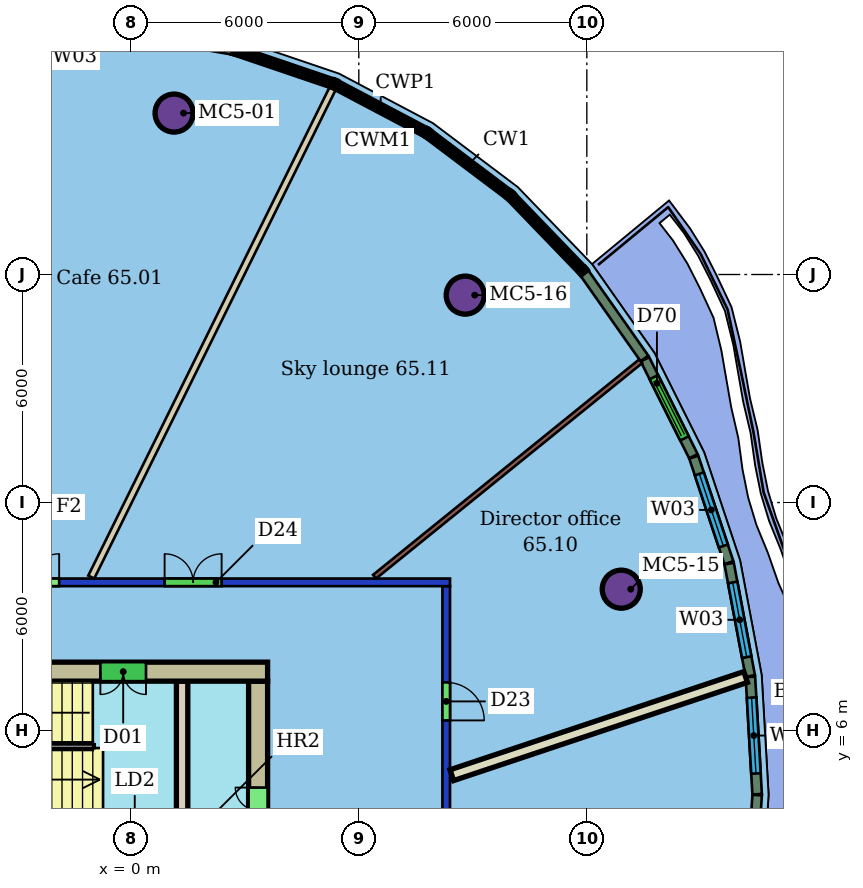
"""IFC4 building model, lengths in metres.
Left out: names, types, materials, properties, quantities, classifications, styles, units other than length and angle.
Written with IfcOpenShell. Run it as: python <this file> out.ifc"""

import sys

from ifc_helpers import new_model, si_unit, direction, frame, frame_2d, origin, origin_2d, place, context, subcontext, project, spatial, rectangle, hollow_circle, extrude, element, fill, save


model = new_model("IFC4")
c1 = context("Model", 3, precision=1e-05, world=origin(), true_north=direction((0.0, 1.0)))
c2 = subcontext(c1, "Body", "Model", "MODEL_VIEW")
j1 = project(units=[si_unit("LENGTHUNIT", "METRE"), si_unit("PLANEANGLEUNIT", "RADIAN")], contexts=[c1])
p1 = place(None, origin())
s1 = spatial("IfcSite", under=j1, at=p1, CompositionType="ELEMENT")
p2 = place(p1, origin())
s2 = spatial("IfcBuilding", under=s1, at=p2, CompositionType="ELEMENT")
p3 = place(p2, frame((0.0, 0.0, 264.9)))
s3 = spatial("IfcBuildingStorey", under=s2, at=p3, CompositionType="ELEMENT", Elevation=264.9)
for number, where, z_axis, x_axis in (
    (1, (1.138, 22.247, 0.0), (0.0, 0.0, 1.0), (1.0, 0.0, 0.0)),
    (2, (12.906, 9.72, 0.0), (0.0, 0.0, 1.0), (1.0, 0.0, 0.0)),
    (3, (8.8, 17.457, 0.0), (0.0, 0.0, 1.0), (1.0, 0.0, 0.0)),
):
    element("IfcColumn", number, at=place(p3, frame(where, z_axis=z_axis, x_axis=x_axis)), inside=s3, PredefinedType="COLUMN", context=c2, shape_type="SweptSolid", body=[
        extrude(hollow_circle(Radius=0.5, WallThickness=0.04, at=origin_2d()), origin(), (0.0, 0.0, 1.0), 3.45),
    ])
p4 = place(p3, frame((-20.4, 9.9, 0.0), z_axis=(0.0, 0.0, 1.0), x_axis=(1.0, 0.0, 0.0)))
e4 = element("IfcWall", 4, at=p4, inside=s3, PredefinedType="PARTITIONING", context=c2, shape_type="SweptSolid", body=[
    extrude(rectangle(XDim=28.8, YDim=0.2, at=frame_2d((14.4, 0.0))), origin(), (0.0, 0.0, 1.0), 3.1),
])
p5 = place(p4, frame((17.015, 0.0, 0.0)))
e5 = element("IfcOpeningElement", 5, at=p5, cuts=e4, PredefinedType="OPENING", context=c2, shape_type="SweptSolid", body=[
    extrude(rectangle(XDim=1.5, YDim=2.4, at=frame_2d((0.75, 1.2))), frame((0.0, 0.11, 0.0), z_axis=(0.0, -1.0, 0.0), x_axis=(1.0, 0.0, 0.0)), (0.0, 0.0, 1.0), 0.22),
])
p6 = place(p4, frame((10.363, 0.0, 0.0)))
e6 = element("IfcOpeningElement", 6, at=p6, cuts=e4, PredefinedType="OPENING", context=c2, shape_type="SweptSolid", body=[
    extrude(rectangle(XDim=1.5, YDim=2.1, at=frame_2d((0.75, 1.05))), frame((0.0, 0.11, 0.0), z_axis=(0.0, -1.0, 0.0), x_axis=(1.0, 0.0, 0.0)), (0.0, 0.0, 1.0), 0.22),
])
p7 = place(p4, frame((21.29, 0.0, 0.0)))
e7 = element("IfcOpeningElement", 7, at=p7, cuts=e4, PredefinedType="OPENING", context=c2, shape_type="SweptSolid", body=[
    extrude(rectangle(XDim=1.5, YDim=2.1, at=frame_2d((0.75, 1.05))), frame((0.0, 0.11, 0.0), z_axis=(0.0, -1.0, 0.0), x_axis=(1.0, 0.0, 0.0)), (0.0, 0.0, 1.0), 0.22),
])
p8 = place(p3, frame((8.3, 9.8, 0.0), z_axis=(0.0, 0.0, 1.0), x_axis=(0.0, -1.0, 0.0)))
e8 = element("IfcWall", 8, at=p8, inside=s3, PredefinedType="PARTITIONING", context=c2, shape_type="SweptSolid", body=[
    extrude(rectangle(XDim=19.6, YDim=0.2, at=frame_2d((9.8, 0.0))), origin(), (0.0, 0.0, 1.0), 3.1),
])
p9 = place(p8, frame((7.946, 0.0, 0.0)))
e9 = element("IfcOpeningElement", 9, at=p9, cuts=e8, PredefinedType="OPENING", context=c2, shape_type="SweptSolid", body=[
    extrude(rectangle(XDim=1.8, YDim=2.4, at=frame_2d((0.9, 1.2))), frame((0.0, 0.11, 0.0), z_axis=(0.0, -1.0, 0.0), x_axis=(1.0, 0.0, 0.0)), (0.0, 0.0, 1.0), 0.22),
])
p10 = place(p8, frame((2.533, 0.0, 0.0)))
e10 = element("IfcOpeningElement", 10, at=p10, cuts=e8, PredefinedType="OPENING", context=c2, shape_type="SweptSolid", body=[
    extrude(rectangle(XDim=1.0, YDim=2.4, at=frame_2d((0.5, 1.2))), frame((0.0, 0.11, 0.0), z_axis=(0.0, -1.0, 0.0), x_axis=(1.0, 0.0, 0.0)), (0.0, 0.0, 1.0), 0.22),
])
p11 = place(p3, frame((5.312, 22.895, 0.0), z_axis=(0.0, 0.0, 1.0), x_axis=(-0.442945398148, -0.896548590016, 0.0)))
e11 = element("IfcWall", 11, at=p11, inside=s3, PredefinedType="PARTITIONING", context=c2, shape_type="SweptSolid", body=[
    extrude(rectangle(XDim=14.34, YDim=0.175, at=frame_2d((7.17, 0.0))), origin(), (0.0, 0.0, 1.0), 3.45),
])
p12 = place(p3, frame((16.179, 7.409, 0.0), z_axis=(0.0, 0.0, 1.0), x_axis=(-0.948479442835, -0.316838675858, 0.0)))
e12 = element("IfcWall", 12, at=p12, inside=s3, PredefinedType="PARTITIONING", context=c2, shape_type="SweptSolid", body=[
    extrude(rectangle(XDim=8.152, YDim=0.3, at=frame_2d((4.076, 0.0))), origin(), (0.0, 0.0, 1.0), 3.45),
])
p13 = place(p3, frame((13.416, 15.716, 0.0), z_axis=(0.0, 0.0, 1.0), x_axis=(-0.777283998604, -0.629149891134, 0.0)))
e13 = element("IfcWall", 13, at=p13, inside=s3, PredefinedType="PARTITIONING", context=c2, shape_type="SweptSolid", body=[
    extrude(rectangle(XDim=9.009, YDim=0.125, at=frame_2d((4.504, 0.0))), origin(), (0.0, 0.0, 1.0), 3.45),
])
p14 = place(p3, frame((2.684, 23.91, 0.0), z_axis=(0.0, 0.0, 1.0), x_axis=(-0.985123538197, 0.171847649069, 0.0)))
e14 = element("IfcWall", 14, at=p14, inside=s3, PredefinedType="SOLIDWALL", context=c2, shape_type="SweptSolid", body=[
    extrude(rectangle(XDim=2.746, YDim=0.25, at=frame_2d((1.373, 0.0))), origin(), (0.0, 0.0, 1.0), 3.15),
])
p15 = place(p3, frame((16.278, 1.139, 0.0), z_axis=(0.0, 0.0, 1.0), x_axis=(0.064473835275, 0.99791939783, 0.0)))
e15 = element("IfcWall", 15, at=p15, inside=s3, PredefinedType="SOLIDWALL", context=c2, shape_type="SweptSolid", body=[
    extrude(rectangle(XDim=3.169, YDim=0.25, at=frame_2d((1.585, 0.0))), origin(), (0.0, 0.0, 1.0), 3.15),
])
p16 = place(p15, frame((0.685, 0.0, 0.0)))
e16 = element("IfcOpeningElement", 16, at=p16, cuts=e15, PredefinedType="OPENING", context=c2, shape_type="SweptSolid", body=[
    extrude(rectangle(XDim=1.8, YDim=2.4, at=frame_2d((0.9, 1.2))), frame((0.0, 0.135, 0.0), z_axis=(0.0, -1.0, 0.0), x_axis=(1.0, 0.0, 0.0)), (0.0, 0.0, 1.0), 0.27),
])
p17 = place(p3, frame((16.482, 4.325, 0.0), z_axis=(0.0, 0.0, 1.0), x_axis=(-0.057643453345, 0.998337233747, 0.0)))
e17 = element("IfcWall", 17, at=p17, inside=s3, PredefinedType="SOLIDWALL", context=c2, shape_type="SweptSolid", body=[
    extrude(rectangle(XDim=3.092, YDim=0.25, at=frame_2d((1.546, 0.0))), origin(), (0.0, 0.0, 1.0), 3.15),
])
p18 = place(p17, frame((0.546, 0.0, 0.9)))
e18 = element("IfcOpeningElement", 18, at=p18, cuts=e17, PredefinedType="OPENING", context=c2, shape_type="SweptSolid", body=[
    extrude(rectangle(XDim=2.0, YDim=2.1, at=frame_2d((1.0, 1.05))), frame((0.0, 0.135, 0.0), z_axis=(0.0, -1.0, 0.0), x_axis=(1.0, 0.0, 0.0)), (0.0, 0.0, 1.0), 0.27),
])
p19 = place(p3, frame((16.301, 7.436, 0.0), z_axis=(0.0, 0.0, 1.0), x_axis=(-0.184915563493, 0.982754412037, 0.0)))
e19 = element("IfcWall", 19, at=p19, inside=s3, PredefinedType="SOLIDWALL", context=c2, shape_type="SweptSolid", body=[
    extrude(rectangle(XDim=3.009, YDim=0.25, at=frame_2d((1.504, 0.0))), origin(), (0.0, 0.0, 1.0), 3.15),
])
p20 = place(p19, frame((0.505, 0.0, 0.9)))
e20 = element("IfcOpeningElement", 20, at=p20, cuts=e19, PredefinedType="OPENING", context=c2, shape_type="SweptSolid", body=[
    extrude(rectangle(XDim=2.0, YDim=2.1, at=frame_2d((1.0, 1.05))), frame((0.0, 0.135, 0.0), z_axis=(0.0, -1.0, 0.0), x_axis=(1.0, 0.0, 0.0)), (0.0, 0.0, 1.0), 0.27),
])
p21 = place(p3, frame((15.739, 10.417, 0.0), z_axis=(0.0, 0.0, 1.0), x_axis=(-0.315802326968, 0.948825005089, 0.0)))
e21 = element("IfcWall", 21, at=p21, inside=s3, PredefinedType="SOLIDWALL", context=c2, shape_type="SweptSolid", body=[
    extrude(rectangle(XDim=2.927, YDim=0.25, at=frame_2d((1.463, 0.0))), origin(), (0.0, 0.0, 1.0), 3.15),
])
p22 = place(p21, frame((0.463, 0.0, 0.9)))
e22 = element("IfcOpeningElement", 22, at=p22, cuts=e21, PredefinedType="OPENING", context=c2, shape_type="SweptSolid", body=[
    extrude(rectangle(XDim=2.0, YDim=2.1, at=frame_2d((1.0, 1.05))), frame((0.0, 0.135, 0.0), z_axis=(0.0, -1.0, 0.0), x_axis=(1.0, 0.0, 0.0)), (0.0, 0.0, 1.0), 0.27),
])
p23 = place(p3, frame((14.804, 13.218, 0.0), z_axis=(0.0, 0.0, 1.0), x_axis=(-0.447145092451, 0.894461439246, 0.0)))
e23 = element("IfcWall", 23, at=p23, inside=s3, PredefinedType="SOLIDWALL", context=c2, shape_type="SweptSolid", body=[
    extrude(rectangle(XDim=2.851, YDim=0.25, at=frame_2d((1.426, 0.0))), origin(), (0.0, 0.0, 1.0), 3.15),
])
p24 = place(p23, frame((0.526, 0.0, 0.0)))
e24 = element("IfcOpeningElement", 24, at=p24, cuts=e23, PredefinedType="OPENING", context=c2, shape_type="SweptSolid", body=[
    extrude(rectangle(XDim=1.8, YDim=2.4, at=frame_2d((0.9, 1.2))), frame((0.0, 0.135, 0.0), z_axis=(0.0, -1.0, 0.0), x_axis=(1.0, 0.0, 0.0)), (0.0, 0.0, 1.0), 0.27),
])
p25 = place(p3, frame((13.516, 15.791, 0.0), z_axis=(0.0, 0.0, 1.0), x_axis=(-0.574964816713, 0.818178134358, 0.0)))
e25 = element("IfcWall", 25, at=p25, inside=s3, PredefinedType="SOLIDWALL", context=c2, shape_type="SweptSolid", body=[
    extrude(rectangle(XDim=2.746, YDim=0.25, at=frame_2d((1.373, 0.0))), origin(), (0.0, 0.0, 1.0), 3.15),
])
p26 = place(p3, frame((3.6, 7.55, 0.0), z_axis=(0.0, 0.0, 1.0), x_axis=(-1.0, 0.0, 0.0)))
e26 = element("IfcWall", 26, at=p26, inside=s3, PredefinedType="SHEAR", context=c2, shape_type="SweptSolid", body=[
    extrude(rectangle(XDim=9.6, YDim=0.5, at=frame_2d((4.8, 0.0))), origin(), (0.0, 0.0, 1.0), 3.3),
])
p27 = place(p26, frame((3.2, 0.0, 0.0)))
e27 = element("IfcOpeningElement", 27, at=p27, cuts=e26, PredefinedType="OPENING", context=c2, shape_type="SweptSolid", body=[
    extrude(rectangle(XDim=1.2, YDim=2.1, at=frame_2d((0.6, 1.05))), frame((0.0, 0.26, 0.0), z_axis=(0.0, -1.0, 0.0), x_axis=(1.0, 0.0, 0.0)), (0.0, 0.0, 1.0), 0.52),
])
p28 = place(p3, frame((3.35, -7.3, 0.0), z_axis=(0.0, 0.0, 1.0), x_axis=(0.0, 1.0, 0.0)))
e28 = element("IfcWall", 28, at=p28, inside=s3, PredefinedType="SHEAR", context=c2, shape_type="SweptSolid", body=[
    extrude(rectangle(XDim=14.6, YDim=0.5, at=frame_2d((7.3, 0.0))), origin(), (0.0, 0.0, 1.0), 3.3),
])
p29 = place(p28, frame((2.8, 0.0, 0.0)))
e29 = element("IfcOpeningElement", 29, at=p29, cuts=e28, PredefinedType="OPENING", context=c2, shape_type="SweptSolid", body=[
    extrude(rectangle(XDim=1.2, YDim=2.1, at=frame_2d((0.6, 1.05))), frame((0.0, 0.26, 0.0), z_axis=(0.0, -1.0, 0.0), x_axis=(1.0, 0.0, 0.0)), (0.0, 0.0, 1.0), 0.52),
])
p30 = place(p28, frame((10.6, 0.0, 0.0)))
e30 = element("IfcOpeningElement", 30, at=p30, cuts=e28, PredefinedType="OPENING", context=c2, shape_type="SweptSolid", body=[
    extrude(rectangle(XDim=1.2, YDim=2.1, at=frame_2d((0.6, 1.05))), frame((0.0, 0.26, 0.0), z_axis=(0.0, -1.0, 0.0), x_axis=(1.0, 0.0, 0.0)), (0.0, 0.0, 1.0), 0.52),
])
p31 = place(p3, frame((1.35, -7.3, 0.0), z_axis=(0.0, 0.0, 1.0), x_axis=(0.0, 1.0, 0.0)))
e31 = element("IfcWall", 31, at=p31, inside=s3, PredefinedType="SHEAR", context=c2, shape_type="SweptSolid", body=[
    extrude(rectangle(XDim=14.6, YDim=0.3, at=frame_2d((7.3, 0.0))), origin(), (0.0, 0.0, 1.0), 3.3),
])
p32 = place(p31, frame((1.21, 0.0, 0.0)))
e32 = element("IfcOpeningElement", 32, at=p32, cuts=e31, PredefinedType="OPENING", context=c2, shape_type="SweptSolid", body=[
    extrude(rectangle(XDim=1.0, YDim=2.1, at=frame_2d((0.5, 1.05))), frame((0.0, 0.16, 0.0), z_axis=(0.0, -1.0, 0.0), x_axis=(1.0, 0.0, 0.0)), (0.0, 0.0, 1.0), 0.32),
])
p33 = place(p31, frame((6.55, 0.0, 0.0)))
e33 = element("IfcOpeningElement", 33, at=p33, cuts=e31, PredefinedType="OPENING", context=c2, shape_type="SweptSolid", body=[
    extrude(rectangle(XDim=1.5, YDim=2.1, at=frame_2d((0.75, 1.05))), frame((0.0, 0.16, 0.0), z_axis=(0.0, -1.0, 0.0), x_axis=(1.0, 0.0, 0.0)), (0.0, 0.0, 1.0), 0.32),
])
p34 = place(p5, origin())
e34 = element("IfcDoor", 34, at=p34, inside=s3, OperationType="DOUBLE_DOOR_SINGLE_SWING", PredefinedType="DOOR", context=c2, shape_type="SweptSolid", body=[
    extrude(rectangle(XDim=1.5, YDim=2.4, at=frame_2d((0.75, 1.2))), frame((0.0, 0.025, 0.0), z_axis=(0.0, -1.0, 0.0), x_axis=(1.0, 0.0, 0.0)), (0.0, 0.0, 1.0), 0.05),
])
fill(e5, e34)
p35 = place(p10, origin())
e35 = element("IfcDoor", 35, at=p35, inside=s3, OperationType="SINGLE_SWING_RIGHT", PredefinedType="DOOR", context=c2, shape_type="SweptSolid", body=[
    extrude(rectangle(XDim=1.0, YDim=2.4, at=frame_2d((0.5, 1.2))), frame((0.0, 0.025, 0.0), z_axis=(0.0, -1.0, 0.0), x_axis=(1.0, 0.0, 0.0)), (0.0, 0.0, 1.0), 0.05),
])
fill(e10, e35)
p36 = place(p7, origin())
e36 = element("IfcDoor", 36, at=p36, inside=s3, OperationType="DOUBLE_DOOR_SINGLE_SWING", PredefinedType="DOOR", context=c2, shape_type="SweptSolid", body=[
    extrude(rectangle(XDim=1.5, YDim=2.1, at=frame_2d((0.75, 1.05))), frame((0.0, 0.025, 0.0), z_axis=(0.0, -1.0, 0.0), x_axis=(1.0, 0.0, 0.0)), (0.0, 0.0, 1.0), 0.05),
])
fill(e7, e36)
p37 = place(p18, origin())
e37 = element("IfcWindow", 37, at=p37, inside=s3, PartitioningType="SINGLE_PANEL", PredefinedType="WINDOW", context=c2, shape_type="SweptSolid", body=[
    extrude(rectangle(XDim=2.0, YDim=2.1, at=frame_2d((1.0, 1.05))), frame((0.0, 0.03, 0.0), z_axis=(0.0, -1.0, 0.0), x_axis=(1.0, 0.0, 0.0)), (0.0, 0.0, 1.0), 0.06),
])
fill(e18, e37)
p38 = place(p20, origin())
e38 = element("IfcWindow", 38, at=p38, inside=s3, PartitioningType="SINGLE_PANEL", PredefinedType="WINDOW", context=c2, shape_type="SweptSolid", body=[
    extrude(rectangle(XDim=2.0, YDim=2.1, at=frame_2d((1.0, 1.05))), frame((0.0, 0.03, 0.0), z_axis=(0.0, -1.0, 0.0), x_axis=(1.0, 0.0, 0.0)), (0.0, 0.0, 1.0), 0.06),
])
fill(e20, e38)
p39 = place(p22, origin())
e39 = element("IfcWindow", 39, at=p39, inside=s3, PartitioningType="SINGLE_PANEL", PredefinedType="WINDOW", context=c2, shape_type="SweptSolid", body=[
    extrude(rectangle(XDim=2.0, YDim=2.1, at=frame_2d((1.0, 1.05))), frame((0.0, 0.03, 0.0), z_axis=(0.0, -1.0, 0.0), x_axis=(1.0, 0.0, 0.0)), (0.0, 0.0, 1.0), 0.06),
])
fill(e22, e39)
p40 = place(p24, origin())
e40 = element("IfcDoor", 40, at=p40, inside=s3, OperationType="DOUBLE_DOOR_SLIDING", PredefinedType="DOOR", context=c2, shape_type="SweptSolid", body=[
    extrude(rectangle(XDim=1.8, YDim=2.4, at=frame_2d((0.9, 1.2))), frame((0.0, 0.025, 0.0), z_axis=(0.0, -1.0, 0.0), x_axis=(1.0, 0.0, 0.0)), (0.0, 0.0, 1.0), 0.05),
])
fill(e24, e40)
p41 = place(p27, origin())
e41 = element("IfcDoor", 41, at=p41, inside=s3, OperationType="DOUBLE_DOOR_SINGLE_SWING", PredefinedType="NOTDEFINED", context=c2, shape_type="SweptSolid", body=[
    extrude(rectangle(XDim=1.2, YDim=2.1, at=frame_2d((0.6, 1.05))), frame((0.0, 0.025, 0.0), z_axis=(0.0, -1.0, 0.0), x_axis=(1.0, 0.0, 0.0)), (0.0, 0.0, 1.0), 0.05),
])
fill(e27, e41)
p42 = place(p30, origin())
e42 = element("IfcDoor", 42, at=p42, inside=s3, OperationType="DOUBLE_DOOR_SINGLE_SWING", PredefinedType="NOTDEFINED", context=c2, shape_type="SweptSolid", body=[
    extrude(rectangle(XDim=1.2, YDim=2.1, at=frame_2d((0.6, 1.05))), frame((0.0, 0.025, 0.0), z_axis=(0.0, -1.0, 0.0), x_axis=(1.0, 0.0, 0.0)), (0.0, 0.0, 1.0), 0.05),
])
fill(e30, e42)
save(model, sys.argv[1])
